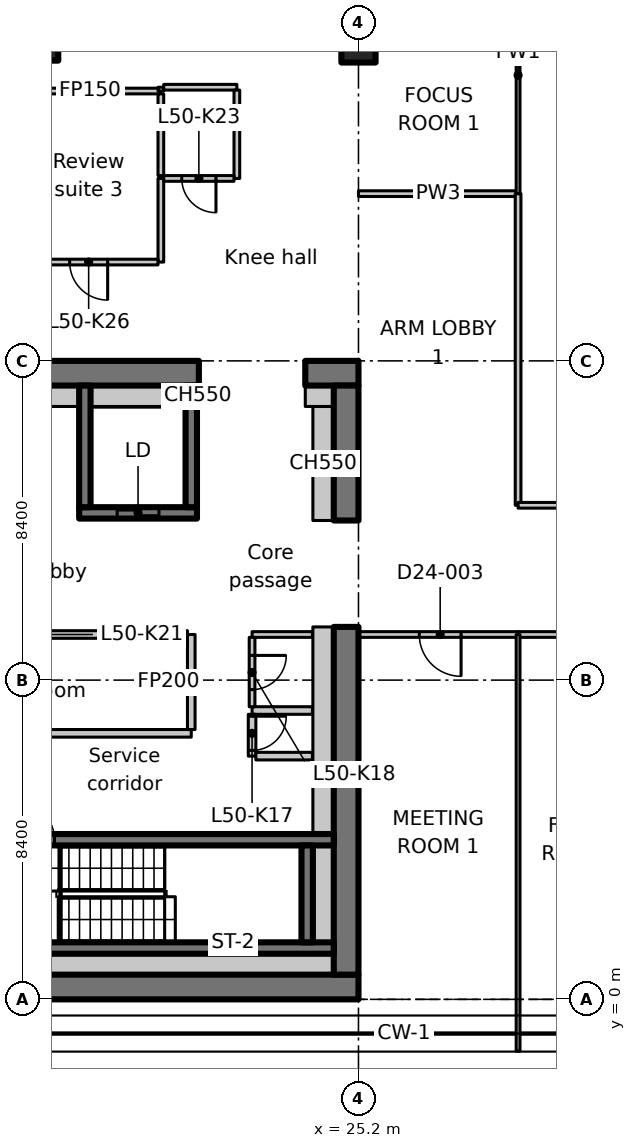
"""IFC4 building model, lengths in metres.
Left out: names, types, materials, properties, quantities, classifications, styles, units other than length and angle.
Written with IfcOpenShell. Run it as: python <this file> out.ifc"""

import sys

from ifc_helpers import new_model, si_unit, direction, frame, frame_2d, origin, origin_2d, place, context, subcontext, project, spatial, polyline, rectangle, outline, extrude, element, fill, save


model = new_model("IFC4")
c1 = context("Model", 3, precision=1e-05, world=origin(), true_north=direction((0.0, 1.0)))
c2 = subcontext(c1, "Body", "Model", "MODEL_VIEW")
j1 = project(units=[si_unit("LENGTHUNIT", "METRE"), si_unit("PLANEANGLEUNIT", "RADIAN")], contexts=[c1])
p1 = place(None, origin())
s1 = spatial("IfcSite", under=j1, at=p1, CompositionType="ELEMENT")
p2 = place(p1, origin())
s2 = spatial("IfcBuilding", under=s1, at=p2, CompositionType="ELEMENT")
p3 = place(p2, frame((0.0, 0.0, 199.2)))
s3 = spatial("IfcBuildingStorey", under=s2, at=p3, CompositionType="ELEMENT", Elevation=199.2)
p4 = place(p3, frame((16.8, 25.2, 0.0), z_axis=(0.0, 0.0, 1.0), x_axis=(1.0, 0.0, 0.0)))
e1 = element("IfcColumn", 1, at=p4, inside=s3, PredefinedType="COLUMN", context=c2, shape_type="SweptSolid", body=[
    extrude(rectangle(XDim=1.0, YDim=1.0, at=origin_2d()), origin(), (0.0, 0.0, 1.0), 3.35),
])
p5 = place(p3, frame((25.2, 25.2, 0.0), z_axis=(0.0, 0.0, 1.0), x_axis=(1.0, 0.0, 0.0)))
e2 = element("IfcColumn", 2, at=p5, inside=s3, PredefinedType="COLUMN", context=c2, shape_type="SweptSolid", body=[
    extrude(rectangle(XDim=0.9, YDim=1.1, at=origin_2d()), origin(), (0.0, 0.0, 1.0), 3.35),
])
p6 = place(p3, frame((7.286, 0.325, 0.0), z_axis=(0.0, 0.0, 1.0), x_axis=(1.0, 0.0, 0.0)))
e3 = element("IfcWall", 3, at=p6, inside=s3, PredefinedType="SHEAR", context=c2, shape_type="SweptSolid", body=[
    extrude(rectangle(XDim=17.914, YDim=0.65, at=frame_2d((8.957, 0.0))), origin(), (0.0, 0.0, 1.0), 3.35),
])
p7 = place(p3, frame((-1.1, 16.475, 0.0), z_axis=(0.0, 0.0, 1.0), x_axis=(1.0, 0.0, 0.0)))
e4 = element("IfcWall", 4, at=p7, inside=s3, PredefinedType="SHEAR", context=c2, shape_type="SweptSolid", body=[
    extrude(rectangle(XDim=22.1, YDim=0.65, at=frame_2d((11.05, 0.0))), origin(), (0.0, 0.0, 1.0), 3.35),
])
p8 = place(p7, frame((3.15, 0.0, 0.0)))
e5 = element("IfcOpeningElement", 5, at=p8, cuts=e4, PredefinedType="OPENING", context=c2, shape_type="SweptSolid", body=[
    extrude(rectangle(XDim=1.1, YDim=2.3, at=frame_2d((0.55, 1.15))), frame((0.0, 0.335, 0.0), z_axis=(0.0, -1.0, 0.0), x_axis=(1.0, 0.0, 0.0)), (0.0, 0.0, 1.0), 0.67),
])
p9 = place(p3, frame((23.8, 16.475, 0.0), z_axis=(0.0, 0.0, 1.0), x_axis=(1.0, 0.0, 0.0)))
e6 = element("IfcWall", 6, at=p9, inside=s3, PredefinedType="SHEAR", context=c2, shape_type="SweptSolid", body=[
    extrude(rectangle(XDim=1.4, YDim=0.65, at=frame_2d((0.7, 0.0))), origin(), (0.0, 0.0, 1.0), 3.35),
])
p10 = place(p3, frame((24.875, 0.65, 0.0), z_axis=(0.0, 0.0, 1.0), x_axis=(0.0, 1.0, 0.0)))
e7 = element("IfcWall", 7, at=p10, inside=s3, PredefinedType="SHEAR", context=c2, shape_type="SweptSolid", body=[
    extrude(rectangle(XDim=9.15, YDim=0.65, at=frame_2d((4.575, 0.0))), origin(), (0.0, 0.0, 1.0), 3.35),
])
p11 = place(p3, frame((24.875, 12.6, 0.0), z_axis=(0.0, 0.0, 1.0), x_axis=(0.0, 1.0, 0.0)))
e8 = element("IfcWall", 8, at=p11, inside=s3, PredefinedType="SHEAR", context=c2, shape_type="SweptSolid", body=[
    extrude(rectangle(XDim=3.55, YDim=0.65, at=frame_2d((1.775, 0.0))), origin(), (0.0, 0.0, 1.0), 3.35),
])
p12 = place(p3, frame((24.275, 12.6, 0.0), z_axis=(0.0, 0.0, 1.0), x_axis=(0.0, 1.0, 0.0)))
e9 = element("IfcWall", 9, at=p12, inside=s3, PredefinedType="PARTITIONING", context=c2, shape_type="SweptSolid", body=[
    extrude(rectangle(XDim=3.0, YDim=0.55, at=frame_2d((1.5, 0.0))), origin(), (0.0, 0.0, 1.0), 3.35),
])
p13 = place(p3, frame((23.8, 15.875, 0.0), z_axis=(0.0, 0.0, 1.0), x_axis=(1.0, 0.0, 0.0)))
e10 = element("IfcWall", 10, at=p13, inside=s3, PredefinedType="PARTITIONING", context=c2, shape_type="SweptSolid", body=[
    extrude(rectangle(XDim=0.75, YDim=0.55, at=frame_2d((0.375, 0.0))), origin(), (0.0, 0.0, 1.0), 3.35),
])
p14 = place(p3, frame((17.85, 12.8, 0.0), z_axis=(0.0, 0.0, 1.0), x_axis=(1.0, 0.0, 0.0)))
e11 = element("IfcWall", 11, at=p14, inside=s3, PredefinedType="SHEAR", context=c2, shape_type="SweptSolid", body=[
    extrude(rectangle(XDim=3.1, YDim=0.3, at=frame_2d((1.55, 0.0))), origin(), (0.0, 0.0, 1.0), 3.35),
])
p15 = place(p14, frame((1.0, 0.0, 0.0)))
e12 = element("IfcOpeningElement", 12, at=p15, cuts=e11, PredefinedType="OPENING", context=c2, shape_type="SweptSolid", body=[
    extrude(rectangle(XDim=1.1, YDim=2.3, at=frame_2d((0.55, 1.15))), frame((0.0, 0.16, 0.0), z_axis=(0.0, -1.0, 0.0), x_axis=(1.0, 0.0, 0.0)), (0.0, 0.0, 1.0), 0.32),
])
for number, where, z_axis, x_axis in (
    (13, (18.0, 12.95, 0.0), (0.0, 0.0, 1.0), (0.0, 1.0, 0.0)),
    (14, (20.8, 12.95, 0.0), (0.0, 0.0, 1.0), (0.0, 1.0, 0.0)),
):
    element("IfcWall", number, at=place(p3, frame(where, z_axis=z_axis, x_axis=x_axis)), inside=s3, PredefinedType="SHEAR", context=c2, shape_type="SweptSolid", body=[
        extrude(rectangle(XDim=3.2, YDim=0.3, at=frame_2d((1.6, 0.0))), origin(), (0.0, 0.0, 1.0), 3.35),
    ])
p16 = place(p3, frame((15.8, 1.35, 0.0), z_axis=(0.0, 0.0, 1.0), x_axis=(1.0, 0.0, 0.0)))
e15 = element("IfcWall", 15, at=p16, inside=s3, PredefinedType="SHEAR", context=c2, shape_type="SweptSolid", body=[
    extrude(rectangle(XDim=8.75, YDim=0.3, at=frame_2d((4.375, 0.0))), origin(), (0.0, 0.0, 1.0), 3.35),
])
p17 = place(p3, frame((15.8, 4.2, 0.0), z_axis=(0.0, 0.0, 1.0), x_axis=(1.0, 0.0, 0.0)))
e16 = element("IfcWall", 16, at=p17, inside=s3, PredefinedType="SHEAR", context=c2, shape_type="SweptSolid", body=[
    extrude(rectangle(XDim=8.75, YDim=0.3, at=frame_2d((4.375, 0.0))), origin(), (0.0, 0.0, 1.0), 3.35),
])
p18 = place(p17, frame((0.4, 0.0, 0.0)))
e17 = element("IfcOpeningElement", 17, at=p18, cuts=e16, PredefinedType="OPENING", context=c2, shape_type="SweptSolid", body=[
    extrude(rectangle(XDim=1.0, YDim=2.1, at=frame_2d((0.5, 1.05))), frame((0.0, 0.16, 0.0), z_axis=(0.0, -1.0, 0.0), x_axis=(1.0, 0.0, 0.0)), (0.0, 0.0, 1.0), 0.32),
])
p19 = place(p3, frame((23.85, 1.5, 0.0), z_axis=(0.0, 0.0, 1.0), x_axis=(0.0, 1.0, 0.0)))
e18 = element("IfcWall", 18, at=p19, inside=s3, PredefinedType="SHEAR", context=c2, shape_type="SweptSolid", body=[
    extrude(rectangle(XDim=2.55, YDim=0.3, at=frame_2d((1.275, 0.0))), origin(), (0.0, 0.0, 1.0), 3.35),
])
p20 = place(p3, frame((12.4, 7.0, 0.0), z_axis=(0.0, 0.0, 1.0), x_axis=(1.0, 0.0, 0.0)))
e19 = element("IfcWall", 19, at=p20, inside=s3, PredefinedType="PARTITIONING", context=c2, shape_type="SweptSolid", body=[
    extrude(rectangle(XDim=8.4, YDim=0.2, at=frame_2d((4.2, 0.0))), origin(), (0.0, 0.0, 1.0), 3.35),
])
p21 = place(p3, frame((20.8, 7.1, 0.0), z_axis=(0.0, 0.0, 1.0), x_axis=(0.0, 1.0, 0.0)))
e20 = element("IfcWall", 20, at=p21, inside=s3, PredefinedType="PARTITIONING", context=c2, shape_type="SweptSolid", body=[
    extrude(rectangle(XDim=2.5, YDim=0.2, at=frame_2d((1.25, 0.0))), origin(), (0.0, 0.0, 1.0), 3.35),
])
p22 = place(p3, frame((20.7, 9.6, 0.0), z_axis=(0.0, 0.0, 1.0), x_axis=(-1.0, 0.0, 0.0)))
e21 = element("IfcWall", 21, at=p22, inside=s3, PredefinedType="PARTITIONING", context=c2, shape_type="SweptSolid", body=[
    extrude(rectangle(XDim=8.3, YDim=0.2, at=frame_2d((4.15, 0.0))), origin(), (0.0, 0.0, 1.0), 3.35),
])
p23 = place(p22, frame((3.65, 0.0, 0.0)))
e22 = element("IfcOpeningElement", 22, at=p23, cuts=e21, PredefinedType="OPENING", context=c2, shape_type="SweptSolid", body=[
    extrude(rectangle(XDim=0.9, YDim=2.1, at=frame_2d((0.45, 1.05))), frame((0.0, 0.11, 0.0), z_axis=(0.0, -1.0, 0.0), x_axis=(1.0, 0.0, 0.0)), (0.0, 0.0, 1.0), 0.22),
])
p24 = place(p3, frame((23.988, 7.6, 0.0), z_axis=(0.0, 0.0, 1.0), x_axis=(-1.0, 0.0, 0.0)))
e23 = element("IfcWall", 23, at=p24, inside=s3, PredefinedType="PARTITIONING", context=c2, shape_type="SweptSolid", body=[
    extrude(rectangle(XDim=1.588, YDim=0.2, at=frame_2d((0.794, 0.0))), origin(), (0.0, 0.0, 1.0), 3.35),
])
p25 = place(p3, frame((22.4, 7.5, 0.0), z_axis=(0.0, 0.0, 1.0), x_axis=(0.0, -1.0, 0.0)))
e24 = element("IfcWall", 24, at=p25, inside=s3, PredefinedType="PARTITIONING", context=c2, shape_type="SweptSolid", body=[
    extrude(rectangle(XDim=1.1, YDim=0.2, at=frame_2d((0.55, 0.0))), origin(), (0.0, 0.0, 1.0), 3.35),
])
p26 = place(p25, frame((0.05, 0.0, 0.0)))
e25 = element("IfcOpeningElement", 25, at=p26, cuts=e24, PredefinedType="OPENING", context=c2, shape_type="SweptSolid", body=[
    extrude(rectangle(XDim=0.9, YDim=2.1, at=frame_2d((0.45, 1.05))), frame((0.0, 0.11, 0.0), z_axis=(0.0, -1.0, 0.0), x_axis=(1.0, 0.0, 0.0)), (0.0, 0.0, 1.0), 0.22),
])
p27 = place(p3, frame((22.5, 6.4, 0.0), z_axis=(0.0, 0.0, 1.0), x_axis=(1.0, 0.0, 0.0)))
e26 = element("IfcWall", 26, at=p27, inside=s3, PredefinedType="PARTITIONING", context=c2, shape_type="SweptSolid", body=[
    extrude(rectangle(XDim=1.488, YDim=0.2, at=frame_2d((0.744, 0.0))), origin(), (0.0, 0.0, 1.0), 3.35),
])
p28 = place(p3, frame((20.0, 21.6, 0.0), z_axis=(0.0, 0.0, 1.0), x_axis=(0.0, -1.0, 0.0)))
e27 = element("IfcWall", 27, at=p28, inside=s3, PredefinedType="PARTITIONING", context=c2, shape_type="SweptSolid", body=[
    extrude(rectangle(XDim=2.2, YDim=0.15, at=frame_2d((1.1, 0.0))), origin(), (0.0, 0.0, 1.0), 3.35),
])
p29 = place(p3, frame((19.925, 19.4, 0.0), z_axis=(0.0, 0.0, 1.0), x_axis=(-1.0, 0.0, 0.0)))
e28 = element("IfcWall", 28, at=p29, inside=s3, PredefinedType="PARTITIONING", context=c2, shape_type="SweptSolid", body=[
    extrude(rectangle(XDim=3.725, YDim=0.15, at=frame_2d((1.863, 0.0))), origin(), (0.0, 0.0, 1.0), 3.35),
])
p30 = place(p29, frame((1.325, 0.0, 0.0)))
e29 = element("IfcOpeningElement", 29, at=p30, cuts=e28, PredefinedType="OPENING", context=c2, shape_type="SweptSolid", body=[
    extrude(rectangle(XDim=1.0, YDim=2.1, at=frame_2d((0.5, 1.05))), frame((0.0, 0.085, 0.0), z_axis=(0.0, -1.0, 0.0), x_axis=(1.0, 0.0, 0.0)), (0.0, 0.0, 1.0), 0.17),
])
p31 = place(p3, frame((16.275, 23.9, 0.0), z_axis=(0.0, 0.0, 1.0), x_axis=(1.0, 0.0, 0.0)))
e30 = element("IfcWall", 30, at=p31, inside=s3, PredefinedType="PARTITIONING", context=c2, shape_type="SweptSolid", body=[
    extrude(rectangle(XDim=3.725, YDim=0.15, at=frame_2d((1.863, 0.0))), origin(), (0.0, 0.0, 1.0), 3.35),
])
p32 = place(p3, frame((20.0, 23.9, 0.0), z_axis=(0.0, 0.0, 1.0), x_axis=(0.0, 1.0, 0.0)))
e31 = element("IfcWall", 31, at=p32, inside=s3, PredefinedType="PARTITIONING", context=c2, shape_type="SweptSolid", body=[
    extrude(rectangle(XDim=0.1, YDim=0.15, at=frame_2d((0.05, 0.0))), origin(), (0.0, 0.0, 1.0), 3.35),
])
p33 = place(p3, frame((20.075, 24.0, 0.0), z_axis=(0.0, 0.0, 1.0), x_axis=(1.0, 0.0, 0.0)))
e32 = element("IfcWall", 32, at=p33, inside=s3, PredefinedType="PARTITIONING", context=c2, shape_type="SweptSolid", body=[
    extrude(rectangle(XDim=1.925, YDim=0.15, at=frame_2d((0.962, 0.0))), origin(), (0.0, 0.0, 1.0), 3.35),
])
p34 = place(p3, frame((22.0, 23.925, 0.0), z_axis=(0.0, 0.0, 1.0), x_axis=(0.0, -1.0, 0.0)))
e33 = element("IfcWall", 33, at=p34, inside=s3, PredefinedType="PARTITIONING", context=c2, shape_type="SweptSolid", body=[
    extrude(rectangle(XDim=2.325, YDim=0.15, at=frame_2d((1.163, 0.0))), origin(), (0.0, 0.0, 1.0), 3.35),
])
p35 = place(p3, frame((21.925, 21.6, 0.0), z_axis=(0.0, 0.0, 1.0), x_axis=(-1.0, 0.0, 0.0)))
e34 = element("IfcWall", 34, at=p35, inside=s3, PredefinedType="PARTITIONING", context=c2, shape_type="SweptSolid", body=[
    extrude(rectangle(XDim=1.85, YDim=0.15, at=frame_2d((0.925, 0.0))), origin(), (0.0, 0.0, 1.0), 3.35),
])
p36 = place(p35, frame((0.475, 0.0, 0.0)))
e35 = element("IfcOpeningElement", 35, at=p36, cuts=e34, PredefinedType="OPENING", context=c2, shape_type="SweptSolid", body=[
    extrude(rectangle(XDim=0.9, YDim=2.1, at=frame_2d((0.45, 1.05))), frame((0.0, 0.085, 0.0), z_axis=(0.0, -1.0, 0.0), x_axis=(1.0, 0.0, 0.0)), (0.0, 0.0, 1.0), 0.17),
])
p37 = place(p3, frame((20.0, 21.675, 0.0), z_axis=(0.0, 0.0, 1.0), x_axis=(0.0, 1.0, 0.0)))
e36 = element("IfcWall", 36, at=p37, inside=s3, PredefinedType="PARTITIONING", context=c2, shape_type="SweptSolid", body=[
    extrude(rectangle(XDim=2.15, YDim=0.15, at=frame_2d((1.075, 0.0))), origin(), (0.0, 0.0, 1.0), 3.35),
])
p38 = place(p3, frame((23.988, 9.6, 0.0), z_axis=(0.0, 0.0, 1.0), x_axis=(-1.0, 0.0, 0.0)))
e37 = element("IfcWall", 37, at=p38, inside=s3, PredefinedType="PARTITIONING", context=c2, shape_type="SweptSolid", body=[
    extrude(rectangle(XDim=1.588, YDim=0.15, at=frame_2d((0.794, 0.0))), origin(), (0.0, 0.0, 1.0), 3.35),
])
p39 = place(p3, frame((22.4, 9.525, 0.0), z_axis=(0.0, 0.0, 1.0), x_axis=(0.0, -1.0, 0.0)))
e38 = element("IfcWall", 38, at=p39, inside=s3, PredefinedType="PARTITIONING", context=c2, shape_type="SweptSolid", body=[
    extrude(rectangle(XDim=1.825, YDim=0.15, at=frame_2d((0.913, 0.0))), origin(), (0.0, 0.0, 1.0), 3.35),
])
p40 = place(p39, frame((0.475, 0.0, 0.0)))
e39 = element("IfcOpeningElement", 39, at=p40, cuts=e38, PredefinedType="OPENING", context=c2, shape_type="SweptSolid", body=[
    extrude(rectangle(XDim=0.9, YDim=2.1, at=frame_2d((0.45, 1.05))), frame((0.0, 0.085, 0.0), z_axis=(0.0, -1.0, 0.0), x_axis=(1.0, 0.0, 0.0)), (0.0, 0.0, 1.0), 0.17),
])
for number, where, z_axis, x_axis in (
    (40, (15.35, 15.875, 0.0), (0.0, 0.0, 1.0), (1.0, 0.0, 0.0)),
    (41, (18.15, 15.875, 0.0), (0.0, 0.0, 1.0), (1.0, 0.0, 0.0)),
):
    element("IfcWall", number, at=place(p3, frame(where, z_axis=z_axis, x_axis=x_axis)), inside=s3, PredefinedType="PARTITIONING", context=c2, shape_type="SweptSolid", body=[
        extrude(rectangle(XDim=2.5, YDim=0.55, at=frame_2d((1.25, 0.0))), origin(), (0.0, 0.0, 1.0), 3.35),
    ])
p41 = place(p3, frame((20.95, 15.875, 0.0), z_axis=(0.0, 0.0, 1.0), x_axis=(1.0, 0.0, 0.0)))
e42 = element("IfcWall", 42, at=p41, inside=s3, PredefinedType="PARTITIONING", context=c2, shape_type="SweptSolid", body=[
    extrude(rectangle(XDim=0.05, YDim=0.55, at=frame_2d((0.025, 0.0))), origin(), (0.0, 0.0, 1.0), 3.35),
])
p42 = place(p3, frame((13.35, 0.925, 0.0), z_axis=(0.0, 0.0, 1.0), x_axis=(1.0, 0.0, 0.0)))
e43 = element("IfcWall", 43, at=p42, inside=s3, PredefinedType="PARTITIONING", context=c2, shape_type="SweptSolid", body=[
    extrude(rectangle(XDim=11.2, YDim=0.55, at=frame_2d((5.6, 0.0))), origin(), (0.0, 0.0, 1.0), 3.35),
])
p43 = place(p3, frame((24.275, 1.5, 0.0), z_axis=(0.0, 0.0, 1.0), x_axis=(0.0, 1.0, 0.0)))
e44 = element("IfcWall", 44, at=p43, inside=s3, PredefinedType="PARTITIONING", context=c2, shape_type="SweptSolid", body=[
    extrude(rectangle(XDim=2.55, YDim=0.55, at=frame_2d((1.275, 0.0))), origin(), (0.0, 0.0, 1.0), 3.35),
])
p44 = place(p3, frame((24.275, 4.35, 0.0), z_axis=(0.0, 0.0, 1.0), x_axis=(0.0, 1.0, 0.0)))
e45 = element("IfcWall", 45, at=p44, inside=s3, PredefinedType="PARTITIONING", context=c2, shape_type="SweptSolid", body=[
    extrude(rectangle(XDim=5.45, YDim=0.55, at=frame_2d((2.725, 0.0))), origin(), (0.0, 0.0, 1.0), 3.35),
])
p45 = place(p3, frame((25.2, 21.2, 0.0), z_axis=(0.0, 0.0, 1.0), x_axis=(1.0, 0.0, 0.0)))
e46 = element("IfcWall", 46, at=p45, inside=s3, PredefinedType="PARTITIONING", context=c2, shape_type="SweptSolid", body=[
    extrude(rectangle(XDim=4.2, YDim=0.15, at=frame_2d((2.1, 0.0))), origin(), (0.0, 0.0, 1.0), 3.33),
])
p46 = place(p3, frame((29.4, 9.6, 0.0), z_axis=(0.0, 0.0, 1.0), x_axis=(-1.0, 0.0, 0.0)))
e47 = element("IfcWall", 47, at=p46, inside=s3, PredefinedType="PARTITIONING", context=c2, shape_type="SweptSolid", body=[
    extrude(rectangle(XDim=4.2, YDim=0.15, at=frame_2d((2.1, 0.0))), origin(), (0.0, 0.0, 1.0), 3.33),
])
p47 = place(p46, frame((1.5, 0.0, 0.0)))
e48 = element("IfcOpeningElement", 48, at=p47, cuts=e47, PredefinedType="OPENING", context=c2, shape_type="SweptSolid", body=[
    extrude(rectangle(XDim=1.1, YDim=2.1, at=frame_2d((0.55, 1.05))), frame((0.0, 0.085, 0.0), z_axis=(0.0, -1.0, 0.0), x_axis=(1.0, 0.0, 0.0)), (0.0, 0.0, 1.0), 0.17),
])
p48 = place(p3, frame((29.4, 21.2, 0.0), z_axis=(0.0, 0.0, 1.0), x_axis=(0.0, -1.0, 0.0)))
e49 = element("IfcWall", 49, at=p48, inside=s3, PredefinedType="PARTITIONING", context=c2, shape_type="SweptSolid", body=[
    extrude(rectangle(XDim=8.2, YDim=0.15, at=frame_2d((4.1, 0.0))), origin(), (0.0, 0.0, 1.0), 3.33),
])
p49 = place(p3, frame((29.4, 27.429, 0.0), z_axis=(0.0, 0.0, 1.0), x_axis=(0.0, -1.0, 0.0)))
e50 = element("IfcWall", 50, at=p49, inside=s3, PredefinedType="PARTITIONING", context=c2, shape_type="SweptSolid", body=[
    extrude(outline(polyline([(0.0, 0.0), (6.229, 0.0), (6.229, 3.33), (2.679, 3.33), (2.677, 2.98), (1.781, 2.98), (1.779, 3.33), (0.154, 3.33), (0.0, 3.33), (0.0, 0.0)])), frame((0.0, 0.05, 0.0), z_axis=(0.0, -1.0, 0.0), x_axis=(1.0, 0.0, 0.0)), (0.0, 0.0, 1.0), 0.1),
])
for number, where, z_axis, x_axis in (
    (51, (33.6, 9.6, 0.0), (0.0, 0.0, 1.0), (-1.0, 0.0, 0.0)),
    (52, (29.4, 13.0, 0.0), (0.0, 0.0, 1.0), (1.0, 0.0, 0.0)),
):
    element("IfcWall", number, at=place(p3, frame(where, z_axis=z_axis, x_axis=x_axis)), inside=s3, PredefinedType="PARTITIONING", context=c2, shape_type="SweptSolid", body=[
        extrude(rectangle(XDim=4.2, YDim=0.15, at=frame_2d((2.1, 0.0))), origin(), (0.0, 0.0, 1.0), 3.33),
    ])
p50 = place(p3, frame((29.4, 9.6, 0.0), z_axis=(0.0, 0.0, 1.0), x_axis=(0.0, -1.0, 0.0)))
e53 = element("IfcWall", 53, at=p50, inside=s3, PredefinedType="PARTITIONING", context=c2, shape_type="SweptSolid", body=[
    extrude(outline(polyline([(0.0, 0.0), (10.965, 0.0), (10.965, 3.33), (10.7, 3.33), (10.05, 3.33), (10.048, 2.98), (9.152, 2.98), (9.15, 3.33), (0.0, 3.33), (0.0, 0.0)])), frame((0.0, 0.05, 0.0), z_axis=(0.0, -1.0, 0.0), x_axis=(1.0, 0.0, 0.0)), (0.0, 0.0, 1.0), 0.1),
])
p51 = place(p15, origin())
e54 = element("IfcDoor", 54, at=p51, inside=s3, OperationType="SLIDING_TO_LEFT", PredefinedType="DOOR", context=c2, shape_type="SweptSolid", body=[
    extrude(rectangle(XDim=1.1, YDim=2.3, at=frame_2d((0.55, 1.15))), frame((0.0, 0.025, 0.0), z_axis=(0.0, -1.0, 0.0), x_axis=(1.0, 0.0, 0.0)), (0.0, 0.0, 1.0), 0.05),
])
fill(e12, e54)
p52 = place(p18, origin())
e55 = element("IfcDoor", 55, at=p52, inside=s3, OperationType="SINGLE_SWING_RIGHT", PredefinedType="DOOR", context=c2, shape_type="SweptSolid", body=[
    extrude(rectangle(XDim=1.0, YDim=2.1, at=frame_2d((0.5, 1.05))), frame((0.0, 0.025, 0.0), z_axis=(0.0, -1.0, 0.0), x_axis=(1.0, 0.0, 0.0)), (0.0, 0.0, 1.0), 0.05),
])
fill(e17, e55)
p53 = place(p26, origin())
e56 = element("IfcDoor", 56, at=p53, inside=s3, OperationType="SINGLE_SWING_RIGHT", PredefinedType="DOOR", context=c2, shape_type="SweptSolid", body=[
    extrude(rectangle(XDim=0.9, YDim=2.1, at=frame_2d((0.45, 1.05))), frame((0.0, 0.025, 0.0), z_axis=(0.0, -1.0, 0.0), x_axis=(1.0, 0.0, 0.0)), (0.0, 0.0, 1.0), 0.05),
])
fill(e25, e56)
p54 = place(p40, origin())
e57 = element("IfcDoor", 57, at=p54, inside=s3, OperationType="SINGLE_SWING_LEFT", PredefinedType="DOOR", context=c2, shape_type="SweptSolid", body=[
    extrude(rectangle(XDim=0.9, YDim=2.1, at=frame_2d((0.45, 1.05))), frame((0.0, 0.025, 0.0), z_axis=(0.0, -1.0, 0.0), x_axis=(1.0, 0.0, 0.0)), (0.0, 0.0, 1.0), 0.05),
])
fill(e39, e57)
p55 = place(p36, origin())
e58 = element("IfcDoor", 58, at=p55, inside=s3, OperationType="SINGLE_SWING_RIGHT", PredefinedType="DOOR", context=c2, shape_type="SweptSolid", body=[
    extrude(rectangle(XDim=0.9, YDim=2.1, at=frame_2d((0.45, 1.05))), frame((0.0, 0.025, 0.0), z_axis=(0.0, -1.0, 0.0), x_axis=(1.0, 0.0, 0.0)), (0.0, 0.0, 1.0), 0.05),
])
fill(e35, e58)
p56 = place(p30, origin())
e59 = element("IfcDoor", 59, at=p56, inside=s3, OperationType="SINGLE_SWING_LEFT", PredefinedType="DOOR", context=c2, shape_type="SweptSolid", body=[
    extrude(rectangle(XDim=1.0, YDim=2.1, at=frame_2d((0.5, 1.05))), frame((0.0, 0.025, 0.0), z_axis=(0.0, -1.0, 0.0), x_axis=(1.0, 0.0, 0.0)), (0.0, 0.0, 1.0), 0.05),
])
fill(e29, e59)
p57 = place(p47, origin())
e60 = element("IfcDoor", 60, at=p57, inside=s3, OperationType="SINGLE_SWING_LEFT", PredefinedType="DOOR", context=c2, shape_type="SweptSolid", body=[
    extrude(rectangle(XDim=1.1, YDim=2.1, at=frame_2d((0.55, 1.05))), frame((0.0, 0.025, 0.0), z_axis=(0.0, -1.0, 0.0), x_axis=(1.0, 0.0, 0.0)), (0.0, 0.0, 1.0), 0.05),
])
fill(e48, e60)
save(model, sys.argv[1])
